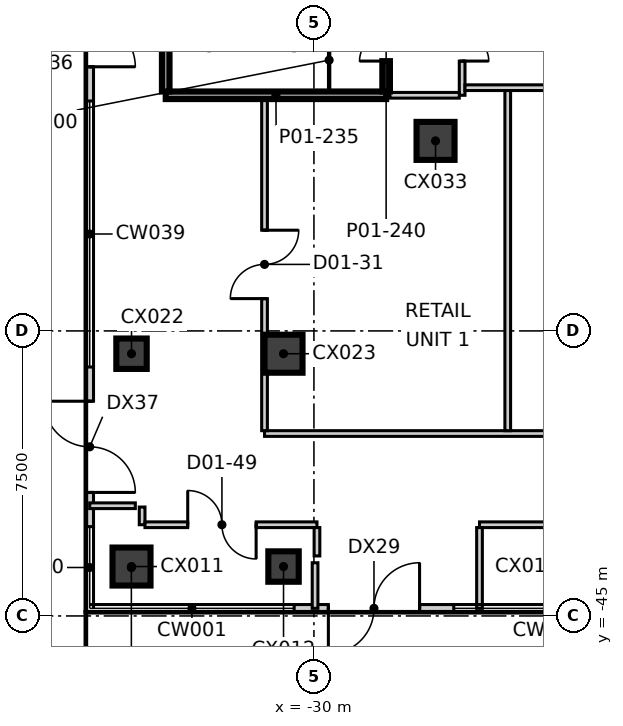
"""IFC4 building model, lengths in metres.
Left out: names, types, materials, properties, quantities, classifications, styles, units other than length and angle.
Written with IfcOpenShell. Run it as: python <this file> out.ifc"""

import sys

from ifc_helpers import new_model, si_unit, direction, frame, frame_2d, origin, origin_2d, place, context, subcontext, project, spatial, rectangle, extrude, element, fill, save


model = new_model("IFC4")
c1 = context("Model", 3, precision=1e-05, world=origin(), true_north=direction((0.0, 1.0)))
c2 = subcontext(c1, "Body", "Model", "MODEL_VIEW")
j1 = project(units=[si_unit("LENGTHUNIT", "METRE"), si_unit("PLANEANGLEUNIT", "RADIAN")], contexts=[c1])
p1 = place(None, origin())
s1 = spatial("IfcSite", under=j1, at=p1, CompositionType="ELEMENT")
p2 = place(p1, origin())
s2 = spatial("IfcBuilding", under=s1, at=p2, CompositionType="ELEMENT")
p3 = place(p2, frame((0.0, 0.0, 8.5)))
s3 = spatial("IfcBuildingStorey", under=s2, at=p3, CompositionType="ELEMENT", Elevation=8.5)
p4 = place(p3, frame((-34.8, -43.7, -0.4), z_axis=(0.0, 0.0, 1.0), x_axis=(1.0, 0.0, 0.0)))
e1 = element("IfcColumn", 1, at=p4, inside=s3, PredefinedType="COLUMN", context=c2, shape_type="SweptSolid", body=[
    extrude(rectangle(XDim=1.0, YDim=1.0, at=origin_2d()), origin(), (0.0, 0.0, 1.0), 6.0),
])
for number, where, z_axis, x_axis in (
    (2, (-30.8, -43.7, -0.4), (0.0, 0.0, 1.0), (1.0, 0.0, 0.0)),
    (3, (-34.8, -38.1, -0.4), (0.0, 0.0, 1.0), (1.0, 0.0, 0.0)),
):
    element("IfcColumn", number, at=place(p3, frame(where, z_axis=z_axis, x_axis=x_axis)), inside=s3, PredefinedType="COLUMN", context=c2, shape_type="SweptSolid", body=[
        extrude(rectangle(XDim=0.8, YDim=0.8, at=origin_2d()), origin(), (0.0, 0.0, 1.0), 6.0),
    ])
for number, where, z_axis, x_axis in (
    (4, (-30.8, -38.1, -0.4), (0.0, 0.0, 1.0), (1.0, 0.0, 0.0)),
    (5, (-26.8, -32.5, -0.4), (0.0, 0.0, 1.0), (1.0, 0.0, 0.0)),
):
    element("IfcColumn", number, at=place(p3, frame(where, z_axis=z_axis, x_axis=x_axis)), inside=s3, PredefinedType="COLUMN", context=c2, shape_type="SweptSolid", body=[
        extrude(rectangle(XDim=1.0, YDim=1.0, at=origin_2d()), origin(), (0.0, 0.0, 1.0), 6.0),
    ])
p5 = place(p3, frame((-30.52, -44.8, 0.0), z_axis=(0.0, 0.0, 1.0), x_axis=(1.0, 0.0, 0.0)))
e6 = element("IfcWall", 6, at=p5, inside=s3, PredefinedType="ELEMENTEDWALL", context=c2, shape_type="SweptSolid", body=[
    extrude(rectangle(XDim=4.2, YDim=0.2, at=frame_2d((2.1, 0.0))), origin(), (0.0, 0.0, 1.0), 5.6),
])
p6 = place(p5, frame((0.9, 0.0, 0.0)))
e7 = element("IfcOpeningElement", 7, at=p6, cuts=e6, PredefinedType="OPENING", context=c2, shape_type="SweptSolid", body=[
    extrude(rectangle(XDim=2.4, YDim=2.4, at=frame_2d((1.2, 1.2))), frame((0.0, 0.11, 0.0), z_axis=(0.0, -1.0, 0.0), x_axis=(1.0, 0.0, 0.0)), (0.0, 0.0, 1.0), 0.22),
])
p7 = place(p3, frame((-35.9, -27.25, 0.0), z_axis=(0.0, 0.0, 1.0), x_axis=(0.0, -1.0, 0.0)))
e8 = element("IfcWall", 8, at=p7, inside=s3, PredefinedType="ELEMENTEDWALL", context=c2, shape_type="SweptSolid", body=[
    extrude(rectangle(XDim=4.2, YDim=0.2, at=frame_2d((2.1, 0.0))), origin(), (0.0, 0.0, 1.0), 5.6),
])
p8 = place(p7, frame((0.9, 0.0, 0.0)))
e9 = element("IfcOpeningElement", 9, at=p8, cuts=e8, PredefinedType="OPENING", context=c2, shape_type="SweptSolid", body=[
    extrude(rectangle(XDim=2.4, YDim=2.4, at=frame_2d((1.2, 1.2))), frame((0.0, 0.11, 0.0), z_axis=(0.0, -1.0, 0.0), x_axis=(1.0, 0.0, 0.0)), (0.0, 0.0, 1.0), 0.22),
])
p9 = place(p3, frame((-35.9, -38.45, 0.0), z_axis=(0.0, 0.0, 1.0), x_axis=(0.0, -1.0, 0.0)))
e10 = element("IfcWall", 10, at=p9, inside=s3, PredefinedType="ELEMENTEDWALL", context=c2, shape_type="SweptSolid", body=[
    extrude(rectangle(XDim=4.2, YDim=0.2, at=frame_2d((2.1, 0.0))), origin(), (0.0, 0.0, 1.0), 5.6),
])
p10 = place(p9, frame((0.9, 0.0, 0.0)))
e11 = element("IfcOpeningElement", 11, at=p10, cuts=e10, PredefinedType="OPENING", context=c2, shape_type="SweptSolid", body=[
    extrude(rectangle(XDim=2.4, YDim=2.4, at=frame_2d((1.2, 1.2))), frame((0.0, 0.11, 0.0), z_axis=(0.0, -1.0, 0.0), x_axis=(1.0, 0.0, 0.0)), (0.0, 0.0, 1.0), 0.22),
])
p11 = place(p3, frame((-26.1, -31.3, 0.0), z_axis=(0.0, 0.0, 1.0), x_axis=(0.0, 1.0, 0.0)))
e12 = element("IfcWall", 12, at=p11, inside=s3, PredefinedType="PARTITIONING", context=c2, shape_type="SweptSolid", body=[
    extrude(rectangle(XDim=3.125, YDim=0.15, at=frame_2d((1.562, 0.0))), origin(), (0.0, 0.0, 1.0), 5.6),
])
p12 = place(p11, frame((0.9, 0.0, 0.0)))
e13 = element("IfcOpeningElement", 13, at=p12, cuts=e12, PredefinedType="OPENING", context=c2, shape_type="SweptSolid", body=[
    extrude(rectangle(XDim=1.4, YDim=2.1, at=frame_2d((0.7, 1.05))), frame((0.0, 0.085, 0.0), z_axis=(0.0, -1.0, 0.0), x_axis=(1.0, 0.0, 0.0)), (0.0, 0.0, 1.0), 0.17),
])
p13 = place(p3, frame((-28.0, -31.3, 0.0), z_axis=(0.0, 0.0, 1.0), x_axis=(1.0, 0.0, 0.0)))
e14 = element("IfcWall", 14, at=p13, inside=s3, PredefinedType="PARTITIONING", context=c2, shape_type="SweptSolid", body=[
    extrude(rectangle(XDim=1.825, YDim=0.15, at=frame_2d((0.913, 0.0))), origin(), (0.0, 0.0, 1.0), 5.6),
])
p14 = place(p3, frame((-35.9, -42.1, 0.0), z_axis=(0.0, 0.0, 1.0), x_axis=(1.0, 0.0, 0.0)))
e15 = element("IfcWall", 15, at=p14, inside=s3, PredefinedType="PARTITIONING", context=c2, shape_type="SweptSolid", body=[
    extrude(rectangle(XDim=1.2, YDim=0.15, at=frame_2d((0.6, 0.0))), origin(), (0.0, 0.0, 1.0), 5.6),
])
p15 = place(p3, frame((-34.521, -42.6, 0.0), z_axis=(0.0, 0.0, 1.0), x_axis=(0.0, 1.0, 0.0)))
e16 = element("IfcWall", 16, at=p15, inside=s3, PredefinedType="PARTITIONING", context=c2, shape_type="SweptSolid", body=[
    extrude(rectangle(XDim=0.466, YDim=0.15, at=frame_2d((0.233, 0.0))), origin(), (0.0, 0.0, 1.0), 5.6),
])
p16 = place(p3, frame((-34.446, -42.6, 0.0), z_axis=(0.0, 0.0, 1.0), x_axis=(1.0, 0.0, 0.0)))
e17 = element("IfcWall", 17, at=p16, inside=s3, PredefinedType="PARTITIONING", context=c2, shape_type="SweptSolid", body=[
    extrude(rectangle(XDim=4.526, YDim=0.15, at=frame_2d((2.263, 0.0))), origin(), (0.0, 0.0, 1.0), 5.6),
])
p17 = place(p16, frame((1.125, 0.0, 0.0)))
e18 = element("IfcOpeningElement", 18, at=p17, cuts=e17, PredefinedType="OPENING", context=c2, shape_type="SweptSolid", body=[
    extrude(rectangle(XDim=1.8, YDim=2.1, at=frame_2d((0.9, 1.05))), frame((0.0, 0.085, 0.0), z_axis=(0.0, -1.0, 0.0), x_axis=(1.0, 0.0, 0.0)), (0.0, 0.0, 1.0), 0.17),
])
p18 = place(p3, frame((-25.643, -42.6, 0.0), z_axis=(0.0, 0.0, 1.0), x_axis=(1.0, 0.0, 0.0)))
e19 = element("IfcWall", 19, at=p18, inside=s3, PredefinedType="PARTITIONING", context=c2, shape_type="SweptSolid", body=[
    extrude(rectangle(XDim=9.783, YDim=0.15, at=frame_2d((4.892, 0.0))), origin(), (0.0, 0.0, 1.0), 5.6),
])
p19 = place(p18, frame((4.392, 0.0, 0.0)))
e20 = element("IfcOpeningElement", 20, at=p19, cuts=e19, PredefinedType="OPENING", context=c2, shape_type="SweptSolid", body=[
    extrude(rectangle(XDim=1.0, YDim=2.1, at=frame_2d((0.5, 1.05))), frame((0.0, 0.085, 0.0), z_axis=(0.0, -1.0, 0.0), x_axis=(1.0, 0.0, 0.0)), (0.0, 0.0, 1.0), 0.17),
])
p20 = place(p3, frame((-29.92, -43.421, 0.0), z_axis=(0.0, 0.0, 1.0), x_axis=(0.0, 1.0, 0.0)))
e21 = element("IfcWall", 21, at=p20, inside=s3, PredefinedType="PARTITIONING", context=c2, shape_type="SweptSolid", body=[
    extrude(rectangle(XDim=0.746, YDim=0.15, at=frame_2d((0.373, 0.0))), origin(), (0.0, 0.0, 1.0), 5.6),
])
p21 = place(p3, frame((-29.97, -44.8, 0.0), z_axis=(0.0, 0.0, 1.0), x_axis=(0.0, 1.0, 0.0)))
e22 = element("IfcWall", 22, at=p21, inside=s3, PredefinedType="PARTITIONING", context=c2, shape_type="SweptSolid", body=[
    extrude(rectangle(XDim=1.2, YDim=0.15, at=frame_2d((0.6, 0.0))), origin(), (0.0, 0.0, 1.0), 5.6),
])
p22 = place(p3, frame((-31.3, -40.2, 0.0), z_axis=(0.0, 0.0, 1.0), x_axis=(1.0, 0.0, 0.0)))
e23 = element("IfcWall", 23, at=p22, inside=s3, PredefinedType="PARTITIONING", context=c2, shape_type="SweptSolid", body=[
    extrude(rectangle(XDim=20.3, YDim=0.15, at=frame_2d((10.15, 0.0))), origin(), (0.0, 0.0, 1.0), 5.6),
])
p23 = place(p22, frame((9.35, 0.0, 0.0)))
e24 = element("IfcOpeningElement", 24, at=p23, cuts=e23, PredefinedType="OPENING", context=c2, shape_type="SweptSolid", body=[
    extrude(rectangle(XDim=1.8, YDim=2.1, at=frame_2d((0.9, 1.05))), frame((0.0, 0.085, 0.0), z_axis=(0.0, -1.0, 0.0), x_axis=(1.0, 0.0, 0.0)), (0.0, 0.0, 1.0), 0.17),
])
p24 = place(p3, frame((-31.3, -40.125, 0.0), z_axis=(0.0, 0.0, 1.0), x_axis=(0.0, 1.0, 0.0)))
e25 = element("IfcWall", 25, at=p24, inside=s3, PredefinedType="PARTITIONING", context=c2, shape_type="SweptSolid", body=[
    extrude(rectangle(XDim=8.725, YDim=0.15, at=frame_2d((4.363, 0.0))), origin(), (0.0, 0.0, 1.0), 5.6),
])
p25 = place(p24, frame((3.475, 0.0, 0.0)))
e26 = element("IfcOpeningElement", 26, at=p25, cuts=e25, PredefinedType="OPENING", context=c2, shape_type="SweptSolid", body=[
    extrude(rectangle(XDim=1.8, YDim=2.1, at=frame_2d((0.9, 1.05))), frame((0.0, 0.085, 0.0), z_axis=(0.0, -1.0, 0.0), x_axis=(1.0, 0.0, 0.0)), (0.0, 0.0, 1.0), 0.17),
])
p26 = place(p3, frame((-26.025, -31.1, 0.0), z_axis=(0.0, 0.0, 1.0), x_axis=(1.0, 0.0, 0.0)))
e27 = element("IfcWall", 27, at=p26, inside=s3, PredefinedType="PARTITIONING", context=c2, shape_type="SweptSolid", body=[
    extrude(rectangle(XDim=5.525, YDim=0.15, at=frame_2d((2.762, 0.0))), origin(), (0.0, 0.0, 1.0), 5.6),
])
p27 = place(p3, frame((-25.643, -44.8, 0.0), z_axis=(0.0, 0.0, 1.0), x_axis=(0.0, 1.0, 0.0)))
e28 = element("IfcWall", 28, at=p27, inside=s3, PredefinedType="PARTITIONING", context=c2, shape_type="SweptSolid", body=[
    extrude(rectangle(XDim=2.125, YDim=0.15, at=frame_2d((1.062, 0.0))), origin(), (0.0, 0.0, 1.0), 5.6),
])
p28 = place(p3, frame((-24.9, -40.125, 0.0), z_axis=(0.0, 0.0, 1.0), x_axis=(0.0, 1.0, 0.0)))
e29 = element("IfcWall", 29, at=p28, inside=s3, PredefinedType="PARTITIONING", context=c2, shape_type="SweptSolid", body=[
    extrude(rectangle(XDim=8.95, YDim=0.15, at=frame_2d((4.475, 0.0))), origin(), (0.0, 0.0, 1.0), 5.6),
])
p29 = place(p3, frame((-33.9, -31.3, 0.0), z_axis=(0.0, 0.0, 1.0), x_axis=(1.0, 0.0, 0.0)))
e30 = element("IfcWall", 30, at=p29, inside=s3, PredefinedType="SOLIDWALL", context=c2, shape_type="SweptSolid", body=[
    extrude(rectangle(XDim=5.8, YDim=0.2, at=frame_2d((2.9, 0.0))), origin(), (0.0, 0.0, 1.0), 5.6),
])
p30 = place(p3, frame((-33.9, -31.2, 0.0), z_axis=(0.0, 0.0, 1.0), x_axis=(0.0, 1.0, 0.0)))
e31 = element("IfcWall", 31, at=p30, inside=s3, PredefinedType="SOLIDWALL", context=c2, shape_type="SweptSolid", body=[
    extrude(rectangle(XDim=3.1, YDim=0.2, at=frame_2d((1.55, 0.0))), origin(), (0.0, 0.0, 1.0), 5.6),
])
p31 = place(p3, frame((-28.1, -31.2, 0.0), z_axis=(0.0, 0.0, 1.0), x_axis=(0.0, 1.0, 0.0)))
e32 = element("IfcWall", 32, at=p31, inside=s3, PredefinedType="SOLIDWALL", context=c2, shape_type="SweptSolid", body=[
    extrude(rectangle(XDim=3.0, YDim=0.2, at=frame_2d((1.5, 0.0))), origin(), (0.0, 0.0, 1.0), 5.6),
])
p32 = place(p31, frame((0.8, 0.0, 0.0)))
e33 = element("IfcOpeningElement", 33, at=p32, cuts=e32, PredefinedType="OPENING", context=c2, shape_type="SweptSolid", body=[
    extrude(rectangle(XDim=1.4, YDim=2.1, at=frame_2d((0.7, 1.05))), frame((0.0, 0.11, 0.0), z_axis=(0.0, -1.0, 0.0), x_axis=(1.0, 0.0, 0.0)), (0.0, 0.0, 1.0), 0.22),
])
p33 = place(p6, frame((2.4, 0.0, 0.0), z_axis=(0.0, 0.0, 1.0), x_axis=(-1.0, 0.0, 0.0)))
e34 = element("IfcDoor", 34, at=p33, inside=s3, OperationType="DOUBLE_DOOR_SINGLE_SWING", PredefinedType="DOOR", context=c2, shape_type="SweptSolid", body=[
    extrude(rectangle(XDim=2.4, YDim=2.4, at=frame_2d((1.2, 1.2))), frame((0.0, 0.025, 0.0), z_axis=(0.0, -1.0, 0.0), x_axis=(1.0, 0.0, 0.0)), (0.0, 0.0, 1.0), 0.05),
])
fill(e7, e34)
p34 = place(p8, frame((2.4, 0.0, 0.0), z_axis=(0.0, 0.0, 1.0), x_axis=(-1.0, 0.0, 0.0)))
e35 = element("IfcDoor", 35, at=p34, inside=s3, OperationType="DOUBLE_DOOR_SINGLE_SWING", PredefinedType="DOOR", context=c2, shape_type="SweptSolid", body=[
    extrude(rectangle(XDim=2.4, YDim=2.4, at=frame_2d((1.2, 1.2))), frame((0.0, 0.025, 0.0), z_axis=(0.0, -1.0, 0.0), x_axis=(1.0, 0.0, 0.0)), (0.0, 0.0, 1.0), 0.05),
])
fill(e9, e35)
p35 = place(p10, frame((2.4, 0.0, 0.0), z_axis=(0.0, 0.0, 1.0), x_axis=(-1.0, 0.0, 0.0)))
e36 = element("IfcDoor", 36, at=p35, inside=s3, OperationType="DOUBLE_DOOR_SINGLE_SWING", PredefinedType="DOOR", context=c2, shape_type="SweptSolid", body=[
    extrude(rectangle(XDim=2.4, YDim=2.4, at=frame_2d((1.2, 1.2))), frame((0.0, 0.025, 0.0), z_axis=(0.0, -1.0, 0.0), x_axis=(1.0, 0.0, 0.0)), (0.0, 0.0, 1.0), 0.05),
])
fill(e11, e36)
p36 = place(p32, origin())
e37 = element("IfcDoor", 37, at=p36, inside=s3, OperationType="DOUBLE_DOOR_SINGLE_SWING", PredefinedType="DOOR", context=c2, shape_type="SweptSolid", body=[
    extrude(rectangle(XDim=1.4, YDim=2.1, at=frame_2d((0.7, 1.05))), frame((0.0, 0.025, 0.0), z_axis=(0.0, -1.0, 0.0), x_axis=(1.0, 0.0, 0.0)), (0.0, 0.0, 1.0), 0.05),
])
fill(e33, e37)
p37 = place(p12, origin())
e38 = element("IfcDoor", 38, at=p37, inside=s3, OperationType="DOUBLE_DOOR_SINGLE_SWING", PredefinedType="DOOR", context=c2, shape_type="SweptSolid", body=[
    extrude(rectangle(XDim=1.4, YDim=2.1, at=frame_2d((0.7, 1.05))), frame((0.0, 0.025, 0.0), z_axis=(0.0, -1.0, 0.0), x_axis=(1.0, 0.0, 0.0)), (0.0, 0.0, 1.0), 0.05),
])
fill(e13, e38)
p38 = place(p25, origin())
e39 = element("IfcDoor", 39, at=p38, inside=s3, OperationType="DOUBLE_DOOR_SINGLE_SWING", PredefinedType="DOOR", context=c2, shape_type="SweptSolid", body=[
    extrude(rectangle(XDim=1.8, YDim=2.1, at=frame_2d((0.9, 1.05))), frame((0.0, 0.025, 0.0), z_axis=(0.0, -1.0, 0.0), x_axis=(1.0, 0.0, 0.0)), (0.0, 0.0, 1.0), 0.05),
])
fill(e26, e39)
p39 = place(p17, origin())
e40 = element("IfcDoor", 40, at=p39, inside=s3, OperationType="DOUBLE_DOOR_SINGLE_SWING", PredefinedType="DOOR", context=c2, shape_type="SweptSolid", body=[
    extrude(rectangle(XDim=1.8, YDim=2.1, at=frame_2d((0.9, 1.05))), frame((0.0, 0.025, 0.0), z_axis=(0.0, -1.0, 0.0), x_axis=(1.0, 0.0, 0.0)), (0.0, 0.0, 1.0), 0.05),
])
fill(e18, e40)
save(model, sys.argv[1])
